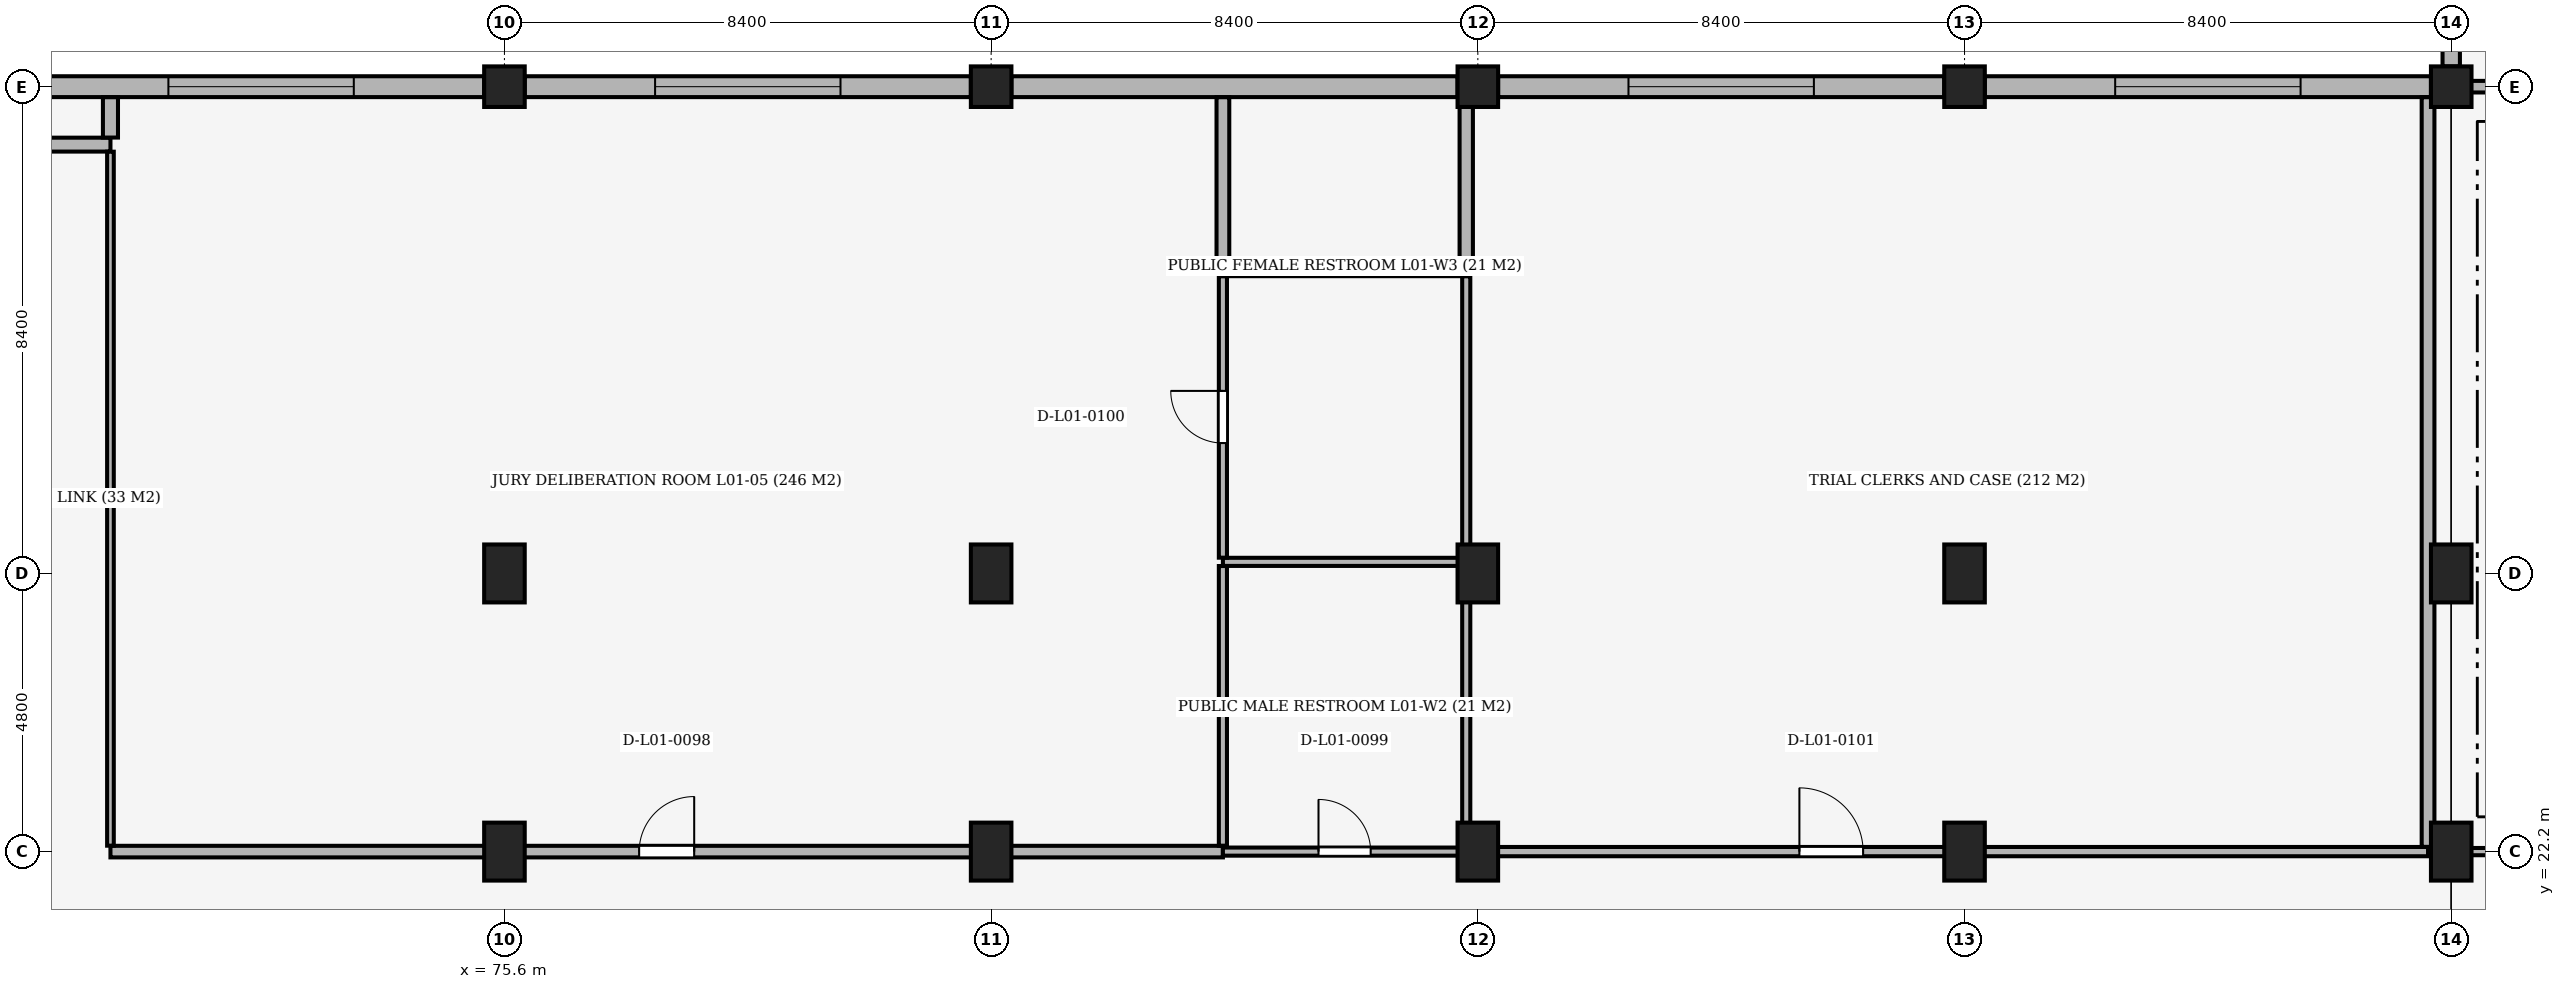
"""IFC4 building model, lengths in metres.
Left out: names, types, materials, properties, quantities, classifications, styles, units other than length and angle.
Written with IfcOpenShell. Run it as: python <this file> out.ifc"""

import sys

from ifc_helpers import new_model, si_unit, direction, frame, frame_2d, origin, origin_2d, place, context, subcontext, project, spatial, rectangle, extrude, element, fill, save


model = new_model("IFC4")
c1 = context("Model", 3, precision=1e-05, world=origin(), true_north=direction((0.0, 1.0)))
c2 = subcontext(c1, "Body", "Model", "MODEL_VIEW")
j1 = project(units=[si_unit("LENGTHUNIT", "METRE"), si_unit("PLANEANGLEUNIT", "RADIAN")], contexts=[c1])
p1 = place(None, origin())
s1 = spatial("IfcSite", under=j1, at=p1, CompositionType="ELEMENT")
p2 = place(p1, origin())
s2 = spatial("IfcBuilding", under=s1, at=p2, CompositionType="ELEMENT")
p3 = place(p2, frame((0.0, 0.0, 5.1)))
s3 = spatial("IfcBuildingStorey", under=s2, at=p3, CompositionType="ELEMENT", Elevation=5.1)
for number, where, z_axis, x_axis in (
    (1, (75.6, 22.2, 0.0), (0.0, 0.0, 1.0), (1.0, 0.0, 0.0)),
    (2, (75.6, 27.0, 0.0), (0.0, 0.0, 1.0), (1.0, 0.0, 0.0)),
):
    element("IfcColumn", number, at=place(p3, frame(where, z_axis=z_axis, x_axis=x_axis)), inside=s3, PredefinedType="COLUMN", context=c2, shape_type="SweptSolid", body=[
        extrude(rectangle(XDim=0.7, YDim=1.0, at=origin_2d()), origin(), (0.0, 0.0, 1.0), 5.1),
    ])
p4 = place(p3, frame((75.6, 35.4, 0.0), z_axis=(0.0, 0.0, 1.0), x_axis=(1.0, 0.0, 0.0)))
e3 = element("IfcColumn", 3, at=p4, inside=s3, PredefinedType="COLUMN", context=c2, shape_type="SweptSolid", body=[
    extrude(rectangle(XDim=0.7, YDim=0.7, at=origin_2d()), origin(), (0.0, 0.0, 1.0), 5.1),
])
for number, where, z_axis, x_axis in (
    (4, (84.0, 22.2, 0.0), (0.0, 0.0, 1.0), (1.0, 0.0, 0.0)),
    (5, (84.0, 27.0, 0.0), (0.0, 0.0, 1.0), (1.0, 0.0, 0.0)),
):
    element("IfcColumn", number, at=place(p3, frame(where, z_axis=z_axis, x_axis=x_axis)), inside=s3, PredefinedType="COLUMN", context=c2, shape_type="SweptSolid", body=[
        extrude(rectangle(XDim=0.7, YDim=1.0, at=origin_2d()), origin(), (0.0, 0.0, 1.0), 5.1),
    ])
p5 = place(p3, frame((84.0, 35.4, 0.0), z_axis=(0.0, 0.0, 1.0), x_axis=(1.0, 0.0, 0.0)))
e6 = element("IfcColumn", 6, at=p5, inside=s3, PredefinedType="COLUMN", context=c2, shape_type="SweptSolid", body=[
    extrude(rectangle(XDim=0.7, YDim=0.7, at=origin_2d()), origin(), (0.0, 0.0, 1.0), 5.1),
])
for number, where, z_axis, x_axis in (
    (7, (92.4, 22.2, 0.0), (0.0, 0.0, 1.0), (1.0, 0.0, 0.0)),
    (8, (92.4, 27.0, 0.0), (0.0, 0.0, 1.0), (1.0, 0.0, 0.0)),
):
    element("IfcColumn", number, at=place(p3, frame(where, z_axis=z_axis, x_axis=x_axis)), inside=s3, PredefinedType="COLUMN", context=c2, shape_type="SweptSolid", body=[
        extrude(rectangle(XDim=0.7, YDim=1.0, at=origin_2d()), origin(), (0.0, 0.0, 1.0), 5.1),
    ])
p6 = place(p3, frame((92.4, 35.4, 0.0), z_axis=(0.0, 0.0, 1.0), x_axis=(1.0, 0.0, 0.0)))
e9 = element("IfcColumn", 9, at=p6, inside=s3, PredefinedType="COLUMN", context=c2, shape_type="SweptSolid", body=[
    extrude(rectangle(XDim=0.7, YDim=0.7, at=origin_2d()), origin(), (0.0, 0.0, 1.0), 5.1),
])
for number, where, z_axis, x_axis in (
    (10, (100.8, 22.2, 0.0), (0.0, 0.0, 1.0), (1.0, 0.0, 0.0)),
    (11, (100.8, 27.0, 0.0), (0.0, 0.0, 1.0), (1.0, 0.0, 0.0)),
):
    element("IfcColumn", number, at=place(p3, frame(where, z_axis=z_axis, x_axis=x_axis)), inside=s3, PredefinedType="COLUMN", context=c2, shape_type="SweptSolid", body=[
        extrude(rectangle(XDim=0.7, YDim=1.0, at=origin_2d()), origin(), (0.0, 0.0, 1.0), 5.1),
    ])
p7 = place(p3, frame((100.8, 35.4, 0.0), z_axis=(0.0, 0.0, 1.0), x_axis=(1.0, 0.0, 0.0)))
e12 = element("IfcColumn", 12, at=p7, inside=s3, PredefinedType="COLUMN", context=c2, shape_type="SweptSolid", body=[
    extrude(rectangle(XDim=0.7, YDim=0.7, at=origin_2d()), origin(), (0.0, 0.0, 1.0), 5.1),
])
for number, where, z_axis, x_axis in (
    (13, (109.2, 22.2, 0.0), (0.0, 0.0, 1.0), (1.0, 0.0, 0.0)),
    (14, (109.2, 27.0, 0.0), (0.0, 0.0, 1.0), (1.0, 0.0, 0.0)),
):
    element("IfcColumn", number, at=place(p3, frame(where, z_axis=z_axis, x_axis=x_axis)), inside=s3, PredefinedType="COLUMN", context=c2, shape_type="SweptSolid", body=[
        extrude(rectangle(XDim=0.7, YDim=1.0, at=origin_2d()), origin(), (0.0, 0.0, 1.0), 5.1),
    ])
p8 = place(p3, frame((109.2, 35.4, 0.0), z_axis=(0.0, 0.0, 1.0), x_axis=(1.0, 0.0, 0.0)))
e15 = element("IfcColumn", 15, at=p8, inside=s3, PredefinedType="COLUMN", context=c2, shape_type="SweptSolid", body=[
    extrude(rectangle(XDim=0.7, YDim=0.7, at=origin_2d()), origin(), (0.0, 0.0, 1.0), 5.1),
])
p9 = place(p3, frame((109.2, 35.75, 0.0), z_axis=(0.0, 0.0, 1.0), x_axis=(0.0, 1.0, 0.0)))
e16 = element("IfcWall", 16, at=p9, inside=s3, PredefinedType="SOLIDWALL", context=c2, shape_type="SweptSolid", body=[
    extrude(rectangle(XDim=4.825, YDim=0.3, at=frame_2d((2.413, 0.0))), origin(), (0.0, 0.0, 1.0), 4.27),
])
p10 = place(p9, frame((0.675, 0.0, 0.85)))
e17 = element("IfcOpeningElement", 17, at=p10, cuts=e16, PredefinedType="OPENING", context=c2, shape_type="SweptSolid", body=[
    extrude(rectangle(XDim=1.4, YDim=2.4, at=frame_2d((0.7, 1.2))), frame((0.0, 0.165, 0.0), z_axis=(0.0, -1.0, 0.0), x_axis=(1.0, 0.0, 0.0)), (0.0, 0.0, 1.0), 0.33),
])
p11 = place(p9, frame((2.75, 0.0, 0.85)))
e18 = element("IfcOpeningElement", 18, at=p11, cuts=e16, PredefinedType="OPENING", context=c2, shape_type="SweptSolid", body=[
    extrude(rectangle(XDim=1.4, YDim=2.4, at=frame_2d((0.7, 1.2))), frame((0.0, 0.165, 0.0), z_axis=(0.0, -1.0, 0.0), x_axis=(1.0, 0.0, 0.0)), (0.0, 0.0, 1.0), 0.33),
])
p12 = place(p3, frame((67.55, 35.4, 0.0), z_axis=(0.0, 0.0, 1.0), x_axis=(1.0, 0.0, 0.0)))
e19 = element("IfcWall", 19, at=p12, inside=s3, PredefinedType="SOLIDWALL", context=c2, shape_type="SweptSolid", body=[
    extrude(rectangle(XDim=7.7, YDim=0.36, at=frame_2d((3.85, 0.0))), origin(), (0.0, 0.0, 1.0), 4.07),
])
p13 = place(p12, frame((2.25, 0.0, 0.75)))
e20 = element("IfcOpeningElement", 20, at=p13, cuts=e19, PredefinedType="OPENING", context=c2, shape_type="SweptSolid", body=[
    extrude(rectangle(XDim=3.2, YDim=2.6, at=frame_2d((1.6, 1.3))), frame((0.0, 0.195, 0.0), z_axis=(0.0, -1.0, 0.0), x_axis=(1.0, 0.0, 0.0)), (0.0, 0.0, 1.0), 0.39),
])
p14 = place(p3, frame((75.95, 35.4, 0.0), z_axis=(0.0, 0.0, 1.0), x_axis=(1.0, 0.0, 0.0)))
e21 = element("IfcWall", 21, at=p14, inside=s3, PredefinedType="SOLIDWALL", context=c2, shape_type="SweptSolid", body=[
    extrude(rectangle(XDim=7.7, YDim=0.36, at=frame_2d((3.85, 0.0))), origin(), (0.0, 0.0, 1.0), 4.07),
])
p15 = place(p14, frame((2.25, 0.0, 0.75)))
e22 = element("IfcOpeningElement", 22, at=p15, cuts=e21, PredefinedType="OPENING", context=c2, shape_type="SweptSolid", body=[
    extrude(rectangle(XDim=3.2, YDim=2.6, at=frame_2d((1.6, 1.3))), frame((0.0, 0.195, 0.0), z_axis=(0.0, -1.0, 0.0), x_axis=(1.0, 0.0, 0.0)), (0.0, 0.0, 1.0), 0.39),
])
p16 = place(p3, frame((84.35, 35.4, 0.0), z_axis=(0.0, 0.0, 1.0), x_axis=(1.0, 0.0, 0.0)))
e23 = element("IfcWall", 23, at=p16, inside=s3, PredefinedType="SOLIDWALL", context=c2, shape_type="SweptSolid", body=[
    extrude(rectangle(XDim=7.7, YDim=0.36, at=frame_2d((3.85, 0.0))), origin(), (0.0, 0.0, 1.0), 4.07),
])
p17 = place(p3, frame((92.75, 35.4, 0.0), z_axis=(0.0, 0.0, 1.0), x_axis=(1.0, 0.0, 0.0)))
e24 = element("IfcWall", 24, at=p17, inside=s3, PredefinedType="SOLIDWALL", context=c2, shape_type="SweptSolid", body=[
    extrude(rectangle(XDim=7.7, YDim=0.36, at=frame_2d((3.85, 0.0))), origin(), (0.0, 0.0, 1.0), 4.07),
])
p18 = place(p17, frame((2.25, 0.0, 0.75)))
e25 = element("IfcOpeningElement", 25, at=p18, cuts=e24, PredefinedType="OPENING", context=c2, shape_type="SweptSolid", body=[
    extrude(rectangle(XDim=3.2, YDim=2.6, at=frame_2d((1.6, 1.3))), frame((0.0, 0.195, 0.0), z_axis=(0.0, -1.0, 0.0), x_axis=(1.0, 0.0, 0.0)), (0.0, 0.0, 1.0), 0.39),
])
p19 = place(p3, frame((101.15, 35.4, 0.0), z_axis=(0.0, 0.0, 1.0), x_axis=(1.0, 0.0, 0.0)))
e26 = element("IfcWall", 26, at=p19, inside=s3, PredefinedType="SOLIDWALL", context=c2, shape_type="SweptSolid", body=[
    extrude(rectangle(XDim=7.7, YDim=0.36, at=frame_2d((3.85, 0.0))), origin(), (0.0, 0.0, 1.0), 4.07),
])
p20 = place(p19, frame((2.25, 0.0, 0.75)))
e27 = element("IfcOpeningElement", 27, at=p20, cuts=e26, PredefinedType="OPENING", context=c2, shape_type="SweptSolid", body=[
    extrude(rectangle(XDim=3.2, YDim=2.6, at=frame_2d((1.6, 1.3))), frame((0.0, 0.195, 0.0), z_axis=(0.0, -1.0, 0.0), x_axis=(1.0, 0.0, 0.0)), (0.0, 0.0, 1.0), 0.39),
])
p21 = place(p3, frame((68.8, 22.2, 0.0), z_axis=(0.0, 0.0, 1.0), x_axis=(1.0, 0.0, 0.0)))
e28 = element("IfcWall", 28, at=p21, inside=s3, PredefinedType="PARTITIONING", context=c2, shape_type="SweptSolid", body=[
    extrude(rectangle(XDim=19.2, YDim=0.2, at=frame_2d((9.6, 0.0))), origin(), (0.0, 0.0, 1.0), 4.07),
])
p22 = place(p21, frame((9.125, 0.0, 0.0)))
e29 = element("IfcOpeningElement", 29, at=p22, cuts=e28, PredefinedType="OPENING", context=c2, shape_type="SweptSolid", body=[
    extrude(rectangle(XDim=0.95, YDim=2.2, at=frame_2d((0.475, 1.1))), frame((0.0, 0.115, 0.0), z_axis=(0.0, -1.0, 0.0), x_axis=(1.0, 0.0, 0.0)), (0.0, 0.0, 1.0), 0.23),
])
p23 = place(p3, frame((88.0, 22.2, 0.0), z_axis=(0.0, 0.0, 1.0), x_axis=(1.0, 0.0, 0.0)))
e30 = element("IfcWall", 30, at=p23, inside=s3, PredefinedType="PARTITIONING", context=c2, shape_type="SweptSolid", body=[
    extrude(rectangle(XDim=4.2, YDim=0.14, at=frame_2d((2.1, 0.0))), origin(), (0.0, 0.0, 1.0), 4.07),
])
p24 = place(p23, frame((1.65, 0.0, 0.0)))
e31 = element("IfcOpeningElement", 31, at=p24, cuts=e30, PredefinedType="OPENING", context=c2, shape_type="SweptSolid", body=[
    extrude(rectangle(XDim=0.9, YDim=2.1, at=frame_2d((0.45, 1.05))), frame((0.0, 0.085, 0.0), z_axis=(0.0, -1.0, 0.0), x_axis=(1.0, 0.0, 0.0)), (0.0, 0.0, 1.0), 0.17),
])
p25 = place(p3, frame((92.2, 22.2, 0.0), z_axis=(0.0, 0.0, 1.0), x_axis=(1.0, 0.0, 0.0)))
e32 = element("IfcWall", 32, at=p25, inside=s3, PredefinedType="PARTITIONING", context=c2, shape_type="SweptSolid", body=[
    extrude(rectangle(XDim=16.6, YDim=0.16, at=frame_2d((8.3, 0.0))), origin(), (0.0, 0.0, 1.0), 4.07),
])
p26 = place(p25, frame((5.75, 0.0, 0.0)))
e33 = element("IfcOpeningElement", 33, at=p26, cuts=e32, PredefinedType="OPENING", context=c2, shape_type="SweptSolid", body=[
    extrude(rectangle(XDim=1.1, YDim=2.1, at=frame_2d((0.55, 1.05))), frame((0.0, 0.095, 0.0), z_axis=(0.0, -1.0, 0.0), x_axis=(1.0, 0.0, 0.0)), (0.0, 0.0, 1.0), 0.19),
])
p27 = place(p3, frame((109.2, 22.2, 0.0), z_axis=(0.0, 0.0, 1.0), x_axis=(1.0, 0.0, 0.0)))
e34 = element("IfcWall", 34, at=p27, inside=s3, PredefinedType="PARTITIONING", context=c2, shape_type="SweptSolid", body=[
    extrude(rectangle(XDim=7.3, YDim=0.125, at=frame_2d((3.65, 0.0))), origin(), (0.0, 0.0, 1.0), 4.07),
])
p28 = place(p3, frame((88.0, 27.2, 0.0), z_axis=(0.0, 0.0, 1.0), x_axis=(1.0, 0.0, 0.0)))
e35 = element("IfcWall", 35, at=p28, inside=s3, PredefinedType="PARTITIONING", context=c2, shape_type="SweptSolid", body=[
    extrude(rectangle(XDim=4.2, YDim=0.14, at=frame_2d((2.1, 0.0))), origin(), (0.0, 0.0, 1.0), 4.07),
])
p29 = place(p3, frame((88.0, 32.2, 0.0), z_axis=(0.0, 0.0, 1.0), x_axis=(1.0, 0.0, 0.0)))
e36 = element("IfcWall", 36, at=p29, inside=s3, PredefinedType="PARTITIONING", context=c2, shape_type="SweptSolid", body=[
    extrude(rectangle(XDim=4.2, YDim=0.14, at=frame_2d((2.1, 0.0))), origin(), (0.0, 0.0, 1.0), 4.02),
])
p30 = place(p3, frame((66.1, 34.4, 0.0), z_axis=(0.0, 0.0, 1.0), x_axis=(1.0, 0.0, 0.0)))
e37 = element("IfcWall", 37, at=p30, inside=s3, PredefinedType="PARTITIONING", context=c2, shape_type="SweptSolid", body=[
    extrude(rectangle(XDim=2.7, YDim=0.24, at=frame_2d((1.35, 0.0))), origin(), (0.0, 0.0, 1.0), 4.02),
])
p31 = place(p3, frame((109.213, 35.4, 0.0), z_axis=(0.0, 0.0, 1.0), x_axis=(1.0, 0.0, 0.0)))
e38 = element("IfcWall", 38, at=p31, inside=s3, PredefinedType="PARTITIONING", context=c2, shape_type="SweptSolid", body=[
    extrude(rectangle(XDim=7.287, YDim=0.2, at=frame_2d((3.644, 0.0))), origin(), (0.0, 0.0, 1.0), 4.07),
])
p32 = place(p3, frame((68.8, 22.302, 0.0), z_axis=(0.0, 0.0, 1.0), x_axis=(0.0, 1.0, 0.0)))
e39 = element("IfcWall", 39, at=p32, inside=s3, PredefinedType="PARTITIONING", context=c2, shape_type="SweptSolid", body=[
    extrude(rectangle(XDim=11.976, YDim=0.115, at=frame_2d((5.988, 0.0))), origin(), (0.0, 0.0, 1.0), 4.07),
])
p33 = place(p3, frame((68.8, 34.522, 0.0), z_axis=(0.0, 0.0, 1.0), x_axis=(0.0, 1.0, 0.0)))
e40 = element("IfcWall", 40, at=p33, inside=s3, PredefinedType="PARTITIONING", context=c2, shape_type="SweptSolid", body=[
    extrude(rectangle(XDim=0.696, YDim=0.26, at=frame_2d((0.348, 0.0))), origin(), (0.0, 0.0, 1.0), 4.07),
])
p34 = place(p3, frame((88.0, 32.272, 0.0), z_axis=(0.0, 0.0, 1.0), x_axis=(0.0, 1.0, 0.0)))
e41 = element("IfcWall", 41, at=p34, inside=s3, PredefinedType="PARTITIONING", context=c2, shape_type="SweptSolid", body=[
    extrude(rectangle(XDim=2.946, YDim=0.22, at=frame_2d((1.473, 0.0))), origin(), (0.0, 0.0, 1.0), 4.07),
])
p35 = place(p3, frame((88.0, 22.302, 0.0), z_axis=(0.0, 0.0, 1.0), x_axis=(0.0, 1.0, 0.0)))
e42 = element("IfcWall", 42, at=p35, inside=s3, PredefinedType="PARTITIONING", context=c2, shape_type="SweptSolid", body=[
    extrude(rectangle(XDim=4.826, YDim=0.14, at=frame_2d((2.413, 0.0))), origin(), (0.0, 0.0, 1.0), 4.07),
])
p36 = place(p3, frame((88.0, 27.272, 0.0), z_axis=(0.0, 0.0, 1.0), x_axis=(0.0, 1.0, 0.0)))
e43 = element("IfcWall", 43, at=p36, inside=s3, PredefinedType="PARTITIONING", context=c2, shape_type="SweptSolid", body=[
    extrude(rectangle(XDim=4.856, YDim=0.14, at=frame_2d((2.428, 0.0))), origin(), (0.0, 0.0, 1.0), 4.07),
])
p37 = place(p36, frame((1.978, 0.0, 0.0)))
e44 = element("IfcOpeningElement", 44, at=p37, cuts=e43, PredefinedType="OPENING", context=c2, shape_type="SweptSolid", body=[
    extrude(rectangle(XDim=0.9, YDim=2.1, at=frame_2d((0.45, 1.05))), frame((0.0, 0.085, 0.0), z_axis=(0.0, -1.0, 0.0), x_axis=(1.0, 0.0, 0.0)), (0.0, 0.0, 1.0), 0.17),
])
p38 = place(p3, frame((92.2, 22.282, 0.0), z_axis=(0.0, 0.0, 1.0), x_axis=(0.0, 1.0, 0.0)))
e45 = element("IfcWall", 45, at=p38, inside=s3, PredefinedType="PARTITIONING", context=c2, shape_type="SweptSolid", body=[
    extrude(rectangle(XDim=4.846, YDim=0.14, at=frame_2d((2.423, 0.0))), origin(), (0.0, 0.0, 1.0), 4.07),
])
p39 = place(p3, frame((92.2, 27.272, 0.0), z_axis=(0.0, 0.0, 1.0), x_axis=(0.0, 1.0, 0.0)))
e46 = element("IfcWall", 46, at=p39, inside=s3, PredefinedType="PARTITIONING", context=c2, shape_type="SweptSolid", body=[
    extrude(rectangle(XDim=4.856, YDim=0.14, at=frame_2d((2.428, 0.0))), origin(), (0.0, 0.0, 1.0), 4.02),
])
p40 = place(p3, frame((92.2, 32.272, 0.0), z_axis=(0.0, 0.0, 1.0), x_axis=(0.0, 1.0, 0.0)))
e47 = element("IfcWall", 47, at=p40, inside=s3, PredefinedType="SOLIDWALL", context=c2, shape_type="SweptSolid", body=[
    extrude(rectangle(XDim=2.98, YDim=0.23, at=frame_2d((1.49, 0.0))), origin(), (0.0, 0.0, 1.0), 4.02),
])
p41 = place(p3, frame((108.8, 22.282, 0.0), z_axis=(0.0, 0.0, 1.0), x_axis=(0.0, 1.0, 0.0)))
e48 = element("IfcWall", 48, at=p41, inside=s3, PredefinedType="PARTITIONING", context=c2, shape_type="SweptSolid", body=[
    extrude(rectangle(XDim=12.936, YDim=0.22, at=frame_2d((6.468, 0.0))), origin(), (0.0, 0.0, 1.0), 4.07),
])
p42 = place(p13, origin())
e49 = element("IfcWindow", 49, at=p42, inside=s3, PartitioningType="SINGLE_PANEL", PredefinedType="WINDOW", context=c2, shape_type="SweptSolid", body=[
    extrude(rectangle(XDim=3.2, YDim=2.6, at=frame_2d((1.6, 1.3))), frame((0.0, 0.03, 0.0), z_axis=(0.0, -1.0, 0.0), x_axis=(1.0, 0.0, 0.0)), (0.0, 0.0, 1.0), 0.06),
])
fill(e20, e49)
p43 = place(p15, origin())
e50 = element("IfcWindow", 50, at=p43, inside=s3, PartitioningType="SINGLE_PANEL", PredefinedType="WINDOW", context=c2, shape_type="SweptSolid", body=[
    extrude(rectangle(XDim=3.2, YDim=2.6, at=frame_2d((1.6, 1.3))), frame((0.0, 0.03, 0.0), z_axis=(0.0, -1.0, 0.0), x_axis=(1.0, 0.0, 0.0)), (0.0, 0.0, 1.0), 0.06),
])
fill(e22, e50)
p44 = place(p18, origin())
e51 = element("IfcWindow", 51, at=p44, inside=s3, PartitioningType="SINGLE_PANEL", PredefinedType="WINDOW", context=c2, shape_type="SweptSolid", body=[
    extrude(rectangle(XDim=3.2, YDim=2.6, at=frame_2d((1.6, 1.3))), frame((0.0, 0.03, 0.0), z_axis=(0.0, -1.0, 0.0), x_axis=(1.0, 0.0, 0.0)), (0.0, 0.0, 1.0), 0.06),
])
fill(e25, e51)
p45 = place(p20, origin())
e52 = element("IfcWindow", 52, at=p45, inside=s3, PartitioningType="SINGLE_PANEL", PredefinedType="WINDOW", context=c2, shape_type="SweptSolid", body=[
    extrude(rectangle(XDim=3.2, YDim=2.6, at=frame_2d((1.6, 1.3))), frame((0.0, 0.03, 0.0), z_axis=(0.0, -1.0, 0.0), x_axis=(1.0, 0.0, 0.0)), (0.0, 0.0, 1.0), 0.06),
])
fill(e27, e52)
p46 = place(p22, origin())
e53 = element("IfcDoor", 53, at=p46, inside=s3, OperationType="SINGLE_SWING_RIGHT", PredefinedType="DOOR", context=c2, shape_type="SweptSolid", body=[
    extrude(rectangle(XDim=0.95, YDim=2.2, at=frame_2d((0.475, 1.1))), frame((0.0, 0.025, 0.0), z_axis=(0.0, -1.0, 0.0), x_axis=(1.0, 0.0, 0.0)), (0.0, 0.0, 1.0), 0.05),
])
fill(e29, e53)
p47 = place(p24, origin())
e54 = element("IfcDoor", 54, at=p47, inside=s3, OperationType="SINGLE_SWING_LEFT", PredefinedType="DOOR", context=c2, shape_type="SweptSolid", body=[
    extrude(rectangle(XDim=0.9, YDim=2.1, at=frame_2d((0.45, 1.05))), frame((0.0, 0.025, 0.0), z_axis=(0.0, -1.0, 0.0), x_axis=(1.0, 0.0, 0.0)), (0.0, 0.0, 1.0), 0.05),
])
fill(e31, e54)
p48 = place(p37, origin())
e55 = element("IfcDoor", 55, at=p48, inside=s3, OperationType="SINGLE_SWING_RIGHT", PredefinedType="DOOR", context=c2, shape_type="SweptSolid", body=[
    extrude(rectangle(XDim=0.9, YDim=2.1, at=frame_2d((0.45, 1.05))), frame((0.0, 0.025, 0.0), z_axis=(0.0, -1.0, 0.0), x_axis=(1.0, 0.0, 0.0)), (0.0, 0.0, 1.0), 0.05),
])
fill(e44, e55)
p49 = place(p26, origin())
e56 = element("IfcDoor", 56, at=p49, inside=s3, OperationType="SINGLE_SWING_LEFT", PredefinedType="DOOR", context=c2, shape_type="SweptSolid", body=[
    extrude(rectangle(XDim=1.1, YDim=2.1, at=frame_2d((0.55, 1.05))), frame((0.0, 0.025, 0.0), z_axis=(0.0, -1.0, 0.0), x_axis=(1.0, 0.0, 0.0)), (0.0, 0.0, 1.0), 0.05),
])
fill(e33, e56)
save(model, sys.argv[1])
